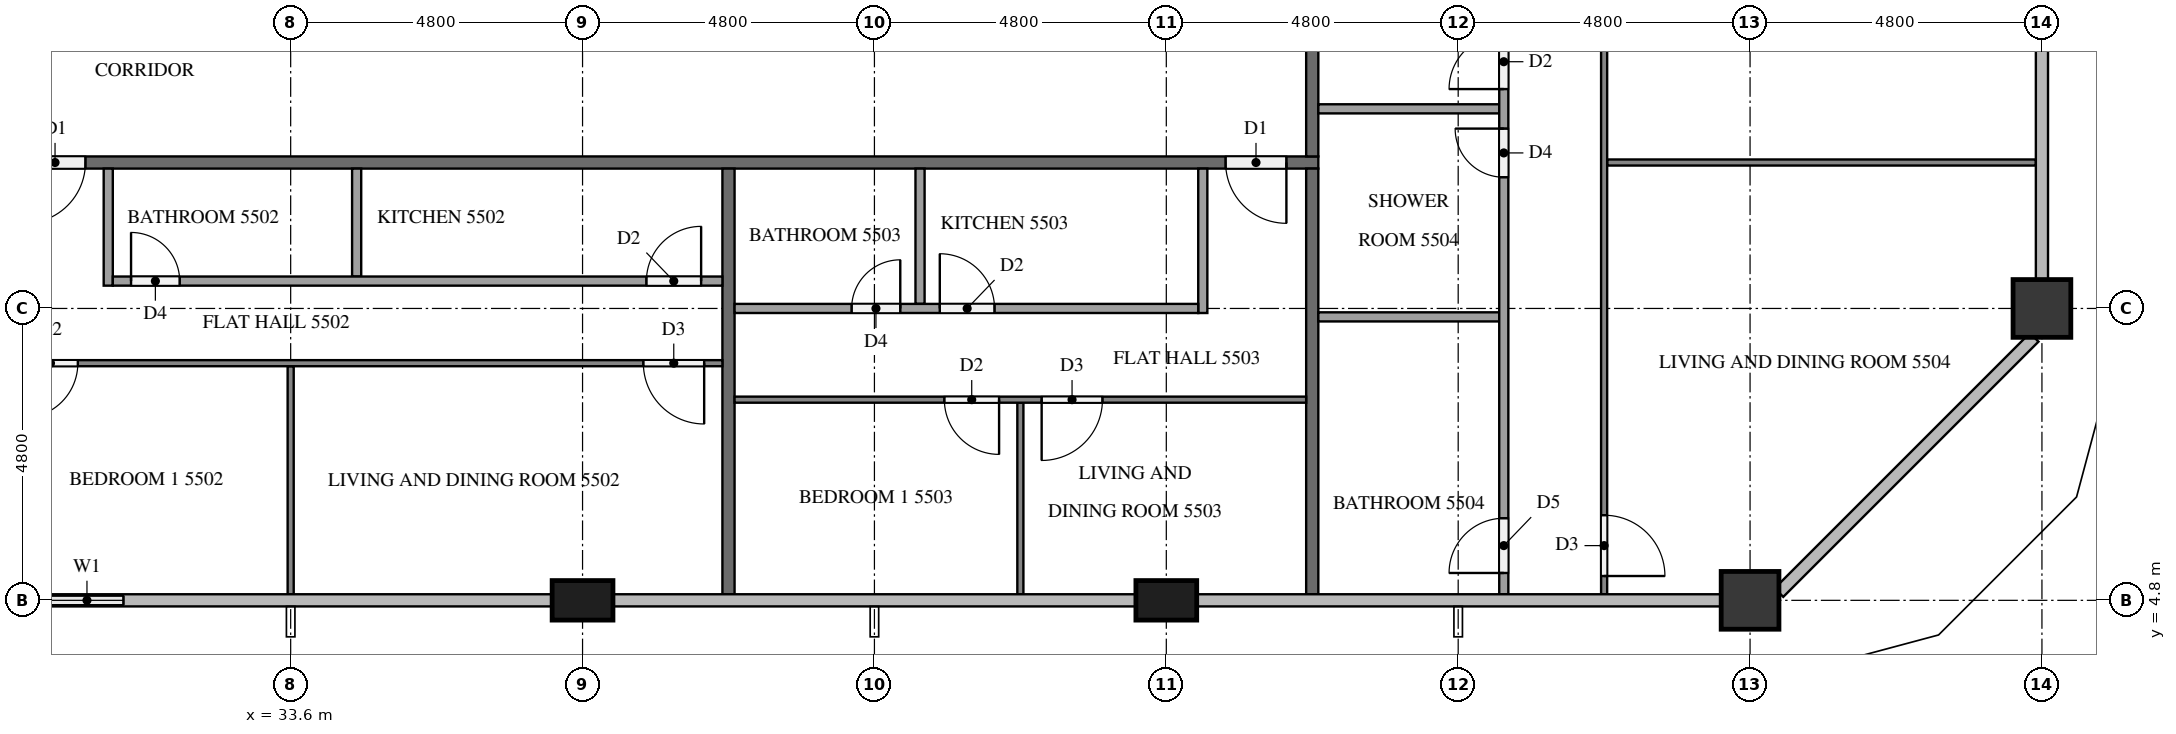
"""IFC4 building model, lengths in metres.
Left out: names, types, materials, properties, quantities, classifications, styles, units other than length and angle.
Written with IfcOpenShell. Run it as: python <this file> out.ifc"""

import sys

from ifc_helpers import new_model, si_unit, direction, frame, frame_2d, origin, origin_2d, place, context, subcontext, project, spatial, rectangle, extrude, element, fill, save


model = new_model("IFC4")
c1 = context("Model", 3, precision=1e-05, world=origin(), true_north=direction((0.0, 1.0)))
c2 = subcontext(c1, "Body", "Model", "MODEL_VIEW")
j1 = project(units=[si_unit("LENGTHUNIT", "METRE"), si_unit("PLANEANGLEUNIT", "RADIAN")], contexts=[c1])
p1 = place(None, origin())
s1 = spatial("IfcSite", under=j1, at=p1, CompositionType="ELEMENT")
p2 = place(p1, origin())
s2 = spatial("IfcBuilding", under=s1, at=p2, CompositionType="ELEMENT")
p3 = place(p2, frame((0.0, 0.0, 212.3)))
s3 = spatial("IfcBuildingStorey", under=s2, at=p3, CompositionType="ELEMENT", Elevation=212.3)
for number, where, z_axis, x_axis in (
    (1, (38.4, 4.8, 0.0), (0.0, 0.0, 1.0), (1.0, 0.0, 0.0)),
    (2, (48.0, 4.8, 0.0), (0.0, 0.0, 1.0), (1.0, 0.0, 0.0)),
):
    element("IfcColumn", number, at=place(p3, frame(where, z_axis=z_axis, x_axis=x_axis)), inside=s3, PredefinedType="COLUMN", context=c2, shape_type="SweptSolid", body=[
        extrude(rectangle(XDim=1.0, YDim=0.65, at=origin_2d()), origin(), (0.0, 0.0, 1.0), 3.2),
    ])
for number, where, z_axis, x_axis in (
    (3, (57.6, 4.8, 0.0), (0.0, 0.0, 1.0), (1.0, 0.0, 0.0)),
    (4, (62.4, 9.6, 0.0), (0.0, 0.0, 1.0), (1.0, 0.0, 0.0)),
):
    element("IfcColumn", number, at=place(p3, frame(where, z_axis=z_axis, x_axis=x_axis)), inside=s3, PredefinedType="COLUMN", context=c2, shape_type="SweptSolid", body=[
        extrude(rectangle(XDim=0.95, YDim=0.95, at=origin_2d()), origin(), (0.0, 0.0, 1.0), 3.2),
    ])
p4 = place(p3, frame((29.3, 4.8, 0.0), z_axis=(0.0, 0.0, 1.0), x_axis=(1.0, 0.0, 0.0)))
e5 = element("IfcWall", 5, at=p4, inside=s3, PredefinedType="SOLIDWALL", context=c2, shape_type="SweptSolid", body=[
    extrude(rectangle(XDim=1.9, YDim=0.15, at=frame_2d((0.95, 0.0))), origin(), (0.0, 0.0, 1.0), 3.2),
])
p5 = place(p4, frame((0.35, 0.0, 0.9)))
e6 = element("IfcOpeningElement", 6, at=p5, cuts=e5, PredefinedType="OPENING", context=c2, shape_type="SweptSolid", body=[
    extrude(rectangle(XDim=1.2, YDim=1.4, at=frame_2d((0.6, 0.7))), frame((0.0, 0.085, 0.0), z_axis=(0.0, -1.0, 0.0), x_axis=(1.0, 0.0, 0.0)), (0.0, 0.0, 1.0), 0.17),
])
p6 = place(p3, frame((50.5, 12.0, 0.0), z_axis=(0.0, 0.0, 1.0), x_axis=(-1.0, 0.0, 0.0)))
e7 = element("IfcWall", 7, at=p6, inside=s3, PredefinedType="PARTITIONING", context=c2, shape_type="SweptSolid", body=[
    extrude(rectangle(XDim=38.6, YDim=0.2, at=frame_2d((19.3, 0.0))), origin(), (0.0, 0.0, 1.0), 3.2),
])
p7 = place(p6, frame((37.075, 0.0, 0.0)))
e8 = element("IfcOpeningElement", 8, at=p7, cuts=e7, PredefinedType="OPENING", context=c2, shape_type="SweptSolid", body=[
    extrude(rectangle(XDim=1.0, YDim=2.1, at=frame_2d((0.5, 1.05))), frame((0.0, 0.11, 0.0), z_axis=(0.0, -1.0, 0.0), x_axis=(1.0, 0.0, 0.0)), (0.0, 0.0, 1.0), 0.22),
])
p8 = place(p6, frame((20.275, 0.0, 0.0)))
e9 = element("IfcOpeningElement", 9, at=p8, cuts=e7, PredefinedType="OPENING", context=c2, shape_type="SweptSolid", body=[
    extrude(rectangle(XDim=1.0, YDim=2.1, at=frame_2d((0.5, 1.05))), frame((0.0, 0.11, 0.0), z_axis=(0.0, -1.0, 0.0), x_axis=(1.0, 0.0, 0.0)), (0.0, 0.0, 1.0), 0.22),
])
p9 = place(p6, frame((0.525, 0.0, 0.0)))
e10 = element("IfcOpeningElement", 10, at=p9, cuts=e7, PredefinedType="OPENING", context=c2, shape_type="SweptSolid", body=[
    extrude(rectangle(XDim=1.0, YDim=2.1, at=frame_2d((0.5, 1.05))), frame((0.0, 0.11, 0.0), z_axis=(0.0, -1.0, 0.0), x_axis=(1.0, 0.0, 0.0)), (0.0, 0.0, 1.0), 0.22),
])
p10 = place(p3, frame((50.4, 40.7, 0.0), z_axis=(0.0, 0.0, 1.0), x_axis=(0.0, -1.0, 0.0)))
e11 = element("IfcWall", 11, at=p10, inside=s3, PredefinedType="PARTITIONING", context=c2, shape_type="SweptSolid", body=[
    extrude(rectangle(XDim=28.6, YDim=0.2, at=frame_2d((14.3, 0.0))), origin(), (0.0, 0.0, 1.0), 3.2),
])
p11 = place(p10, frame((19.525, 0.0, 0.0)))
e12 = element("IfcOpeningElement", 12, at=p11, cuts=e11, PredefinedType="OPENING", context=c2, shape_type="SweptSolid", body=[
    extrude(rectangle(XDim=1.0, YDim=2.1, at=frame_2d((0.5, 1.05))), frame((0.0, 0.11, 0.0), z_axis=(0.0, -1.0, 0.0), x_axis=(1.0, 0.0, 0.0)), (0.0, 0.0, 1.0), 0.22),
])
p12 = place(p10, frame((7.525, 0.0, 0.0)))
e13 = element("IfcOpeningElement", 13, at=p12, cuts=e11, PredefinedType="OPENING", context=c2, shape_type="SweptSolid", body=[
    extrude(rectangle(XDim=1.0, YDim=2.1, at=frame_2d((0.5, 1.05))), frame((0.0, 0.11, 0.0), z_axis=(0.0, -1.0, 0.0), x_axis=(1.0, 0.0, 0.0)), (0.0, 0.0, 1.0), 0.22),
])
p13 = place(p10, frame((0.325, 0.0, 0.0)))
e14 = element("IfcOpeningElement", 14, at=p13, cuts=e11, PredefinedType="OPENING", context=c2, shape_type="SweptSolid", body=[
    extrude(rectangle(XDim=1.0, YDim=2.1, at=frame_2d((0.5, 1.05))), frame((0.0, 0.11, 0.0), z_axis=(0.0, -1.0, 0.0), x_axis=(1.0, 0.0, 0.0)), (0.0, 0.0, 1.0), 0.22),
])
for number, where, z_axis, x_axis in (
    (15, (40.8, 11.9, 0.0), (0.0, 0.0, 1.0), (0.0, -1.0, 0.0)),
    (16, (50.4, 11.9, 0.0), (0.0, 0.0, 1.0), (0.0, -1.0, 0.0)),
):
    element("IfcWall", number, at=place(p3, frame(where, z_axis=z_axis, x_axis=x_axis)), inside=s3, PredefinedType="PARTITIONING", context=c2, shape_type="SweptSolid", body=[
        extrude(rectangle(XDim=7.0, YDim=0.2, at=frame_2d((3.5, 0.0))), origin(), (0.0, 0.0, 1.0), 3.2),
    ])
p14 = place(p3, frame((33.6, 8.65, 0.0), z_axis=(0.0, 0.0, 1.0), x_axis=(0.0, -1.0, 0.0)))
e17 = element("IfcWall", 17, at=p14, inside=s3, PredefinedType="PARTITIONING", context=c2, shape_type="SweptSolid", body=[
    extrude(rectangle(XDim=3.75, YDim=0.1, at=frame_2d((1.875, 0.0))), origin(), (0.0, 0.0, 1.0), 3.2),
])
p15 = place(p3, frame((40.7, 8.7, 0.0), z_axis=(0.0, 0.0, 1.0), x_axis=(-1.0, 0.0, 0.0)))
e18 = element("IfcWall", 18, at=p15, inside=s3, PredefinedType="PARTITIONING", context=c2, shape_type="SweptSolid", body=[
    extrude(rectangle(XDim=11.8, YDim=0.1, at=frame_2d((5.9, 0.0))), origin(), (0.0, 0.0, 1.0), 3.2),
])
p16 = place(p15, frame((10.6, 0.0, 0.0)))
e19 = element("IfcOpeningElement", 19, at=p16, cuts=e18, PredefinedType="OPENING", context=c2, shape_type="SweptSolid", body=[
    extrude(rectangle(XDim=0.9, YDim=2.1, at=frame_2d((0.45, 1.05))), frame((0.0, 0.06, 0.0), z_axis=(0.0, -1.0, 0.0), x_axis=(1.0, 0.0, 0.0)), (0.0, 0.0, 1.0), 0.12),
])
p17 = place(p15, frame((0.3, 0.0, 0.0)))
e20 = element("IfcOpeningElement", 20, at=p17, cuts=e18, PredefinedType="OPENING", context=c2, shape_type="SweptSolid", body=[
    extrude(rectangle(XDim=1.0, YDim=2.1, at=frame_2d((0.5, 1.05))), frame((0.0, 0.06, 0.0), z_axis=(0.0, -1.0, 0.0), x_axis=(1.0, 0.0, 0.0)), (0.0, 0.0, 1.0), 0.12),
])
p18 = place(p3, frame((34.685, 11.9, 0.0), z_axis=(0.0, 0.0, 1.0), x_axis=(0.0, -1.0, 0.0)))
e21 = element("IfcWall", 21, at=p18, inside=s3, PredefinedType="PARTITIONING", context=c2, shape_type="SweptSolid", body=[
    extrude(rectangle(XDim=1.775, YDim=0.15, at=frame_2d((0.887, 0.0))), origin(), (0.0, 0.0, 1.0), 3.2),
])
p19 = place(p3, frame((30.6, 11.9, 0.0), z_axis=(0.0, 0.0, 1.0), x_axis=(0.0, -1.0, 0.0)))
e22 = element("IfcWall", 22, at=p19, inside=s3, PredefinedType="PARTITIONING", context=c2, shape_type="SweptSolid", body=[
    extrude(rectangle(XDim=1.925, YDim=0.15, at=frame_2d((0.962, 0.0))), origin(), (0.0, 0.0, 1.0), 3.2),
])
p20 = place(p3, frame((30.675, 10.05, 0.0), z_axis=(0.0, 0.0, 1.0), x_axis=(1.0, 0.0, 0.0)))
e23 = element("IfcWall", 23, at=p20, inside=s3, PredefinedType="PARTITIONING", context=c2, shape_type="SweptSolid", body=[
    extrude(rectangle(XDim=10.025, YDim=0.15, at=frame_2d((5.012, 0.0))), origin(), (0.0, 0.0, 1.0), 3.2),
])
p21 = place(p20, frame((0.3, 0.0, 0.0)))
e24 = element("IfcOpeningElement", 24, at=p21, cuts=e23, PredefinedType="OPENING", context=c2, shape_type="SweptSolid", body=[
    extrude(rectangle(XDim=0.8, YDim=2.1, at=frame_2d((0.4, 1.05))), frame((0.0, 0.085, 0.0), z_axis=(0.0, -1.0, 0.0), x_axis=(1.0, 0.0, 0.0)), (0.0, 0.0, 1.0), 0.17),
])
p22 = place(p20, frame((8.775, 0.0, 0.0)))
e25 = element("IfcOpeningElement", 25, at=p22, cuts=e23, PredefinedType="OPENING", context=c2, shape_type="SweptSolid", body=[
    extrude(rectangle(XDim=0.9, YDim=2.1, at=frame_2d((0.45, 1.05))), frame((0.0, 0.085, 0.0), z_axis=(0.0, -1.0, 0.0), x_axis=(1.0, 0.0, 0.0)), (0.0, 0.0, 1.0), 0.17),
])
p23 = place(p3, frame((45.6, 8.05, 0.0), z_axis=(0.0, 0.0, 1.0), x_axis=(0.0, -1.0, 0.0)))
e26 = element("IfcWall", 26, at=p23, inside=s3, PredefinedType="PARTITIONING", context=c2, shape_type="SweptSolid", body=[
    extrude(rectangle(XDim=3.15, YDim=0.1, at=frame_2d((1.575, 0.0))), origin(), (0.0, 0.0, 1.0), 3.2),
])
p24 = place(p3, frame((50.3, 8.1, 0.0), z_axis=(0.0, 0.0, 1.0), x_axis=(-1.0, 0.0, 0.0)))
e27 = element("IfcWall", 27, at=p24, inside=s3, PredefinedType="PARTITIONING", context=c2, shape_type="SweptSolid", body=[
    extrude(rectangle(XDim=9.4, YDim=0.1, at=frame_2d((4.7, 0.0))), origin(), (0.0, 0.0, 1.0), 3.2),
])
p25 = place(p24, frame((3.35, 0.0, 0.0)))
e28 = element("IfcOpeningElement", 28, at=p25, cuts=e27, PredefinedType="OPENING", context=c2, shape_type="SweptSolid", body=[
    extrude(rectangle(XDim=1.0, YDim=2.1, at=frame_2d((0.5, 1.05))), frame((0.0, 0.06, 0.0), z_axis=(0.0, -1.0, 0.0), x_axis=(1.0, 0.0, 0.0)), (0.0, 0.0, 1.0), 0.12),
])
p26 = place(p24, frame((5.05, 0.0, 0.0)))
e29 = element("IfcOpeningElement", 29, at=p26, cuts=e27, PredefinedType="OPENING", context=c2, shape_type="SweptSolid", body=[
    extrude(rectangle(XDim=0.9, YDim=2.1, at=frame_2d((0.45, 1.05))), frame((0.0, 0.06, 0.0), z_axis=(0.0, -1.0, 0.0), x_axis=(1.0, 0.0, 0.0)), (0.0, 0.0, 1.0), 0.12),
])
p27 = place(p3, frame((43.95, 11.9, 0.0), z_axis=(0.0, 0.0, 1.0), x_axis=(0.0, -1.0, 0.0)))
e30 = element("IfcWall", 30, at=p27, inside=s3, PredefinedType="PARTITIONING", context=c2, shape_type="SweptSolid", body=[
    extrude(rectangle(XDim=2.225, YDim=0.15, at=frame_2d((1.112, 0.0))), origin(), (0.0, 0.0, 1.0), 3.2),
])
p28 = place(p3, frame((48.6, 11.9, 0.0), z_axis=(0.0, 0.0, 1.0), x_axis=(0.0, -1.0, 0.0)))
e31 = element("IfcWall", 31, at=p28, inside=s3, PredefinedType="PARTITIONING", context=c2, shape_type="SweptSolid", body=[
    extrude(rectangle(XDim=2.375, YDim=0.15, at=frame_2d((1.188, 0.0))), origin(), (0.0, 0.0, 1.0), 3.2),
])
p29 = place(p3, frame((40.9, 9.6, 0.0), z_axis=(0.0, 0.0, 1.0), x_axis=(1.0, 0.0, 0.0)))
e32 = element("IfcWall", 32, at=p29, inside=s3, PredefinedType="PARTITIONING", context=c2, shape_type="SweptSolid", body=[
    extrude(rectangle(XDim=7.625, YDim=0.15, at=frame_2d((3.812, 0.0))), origin(), (0.0, 0.0, 1.0), 3.2),
])
p30 = place(p29, frame((3.375, 0.0, 0.0)))
e33 = element("IfcOpeningElement", 33, at=p30, cuts=e32, PredefinedType="OPENING", context=c2, shape_type="SweptSolid", body=[
    extrude(rectangle(XDim=0.9, YDim=2.1, at=frame_2d((0.45, 1.05))), frame((0.0, 0.085, 0.0), z_axis=(0.0, -1.0, 0.0), x_axis=(1.0, 0.0, 0.0)), (0.0, 0.0, 1.0), 0.17),
])
p31 = place(p29, frame((1.925, 0.0, 0.0)))
e34 = element("IfcOpeningElement", 34, at=p31, cuts=e32, PredefinedType="OPENING", context=c2, shape_type="SweptSolid", body=[
    extrude(rectangle(XDim=0.8, YDim=2.1, at=frame_2d((0.4, 1.05))), frame((0.0, 0.085, 0.0), z_axis=(0.0, -1.0, 0.0), x_axis=(1.0, 0.0, 0.0)), (0.0, 0.0, 1.0), 0.17),
])
p32 = place(p3, frame((55.25, 12.0, 0.0), z_axis=(0.0, 0.0, 1.0), x_axis=(1.0, 0.0, 0.0)))
e35 = element("IfcWall", 35, at=p32, inside=s3, PredefinedType="PARTITIONING", context=c2, shape_type="SweptSolid", body=[
    extrude(rectangle(XDim=7.05, YDim=0.1, at=frame_2d((3.525, 0.0))), origin(), (0.0, 0.0, 1.0), 3.2),
])
p33 = place(p3, frame((55.2, 21.5, 0.0), z_axis=(0.0, 0.0, 1.0), x_axis=(0.0, -1.0, 0.0)))
e36 = element("IfcWall", 36, at=p33, inside=s3, PredefinedType="PARTITIONING", context=c2, shape_type="SweptSolid", body=[
    extrude(rectangle(XDim=16.6, YDim=0.1, at=frame_2d((8.3, 0.0))), origin(), (0.0, 0.0, 1.0), 3.2),
])
p34 = place(p33, frame((3.45, 0.0, 0.0)))
e37 = element("IfcOpeningElement", 37, at=p34, cuts=e36, PredefinedType="OPENING", context=c2, shape_type="SweptSolid", body=[
    extrude(rectangle(XDim=0.9, YDim=2.1, at=frame_2d((0.45, 1.05))), frame((0.0, 0.06, 0.0), z_axis=(0.0, -1.0, 0.0), x_axis=(1.0, 0.0, 0.0)), (0.0, 0.0, 1.0), 0.12),
])
p35 = place(p33, frame((5.05, 0.0, 0.0)))
e38 = element("IfcOpeningElement", 38, at=p35, cuts=e36, PredefinedType="OPENING", context=c2, shape_type="SweptSolid", body=[
    extrude(rectangle(XDim=0.9, YDim=2.1, at=frame_2d((0.45, 1.05))), frame((0.0, 0.06, 0.0), z_axis=(0.0, -1.0, 0.0), x_axis=(1.0, 0.0, 0.0)), (0.0, 0.0, 1.0), 0.12),
])
p36 = place(p33, frame((15.3, 0.0, 0.0)))
e39 = element("IfcOpeningElement", 39, at=p36, cuts=e36, PredefinedType="OPENING", context=c2, shape_type="SweptSolid", body=[
    extrude(rectangle(XDim=1.0, YDim=2.1, at=frame_2d((0.5, 1.05))), frame((0.0, 0.06, 0.0), z_axis=(0.0, -1.0, 0.0), x_axis=(1.0, 0.0, 0.0)), (0.0, 0.0, 1.0), 0.12),
])
for number, where, z_axis, x_axis in (
    (40, (50.5, 12.883, 0.0), (0.0, 0.0, 1.0), (1.0, 0.0, 0.0)),
    (41, (50.5, 9.461, 0.0), (0.0, 0.0, 1.0), (1.0, 0.0, 0.0)),
):
    element("IfcWall", number, at=place(p3, frame(where, z_axis=z_axis, x_axis=x_axis)), inside=s3, PredefinedType="PARTITIONING", context=c2, shape_type="SweptSolid", body=[
        extrude(rectangle(XDim=2.975, YDim=0.15, at=frame_2d((1.488, 0.0))), origin(), (0.0, 0.0, 1.0), 3.2),
    ])
p37 = place(p3, frame((53.55, 4.9, 0.0), z_axis=(0.0, 0.0, 1.0), x_axis=(0.0, 1.0, 0.0)))
e42 = element("IfcWall", 42, at=p37, inside=s3, PredefinedType="PARTITIONING", context=c2, shape_type="SweptSolid", body=[
    extrude(rectangle(XDim=14.825, YDim=0.15, at=frame_2d((7.413, 0.0))), origin(), (0.0, 0.0, 1.0), 3.2),
])
p38 = place(p37, frame((8.308, 0.0, 0.0)))
e43 = element("IfcOpeningElement", 43, at=p38, cuts=e42, PredefinedType="OPENING", context=c2, shape_type="SweptSolid", body=[
    extrude(rectangle(XDim=0.9, YDim=2.1, at=frame_2d((0.45, 1.05))), frame((0.0, 0.085, 0.0), z_axis=(0.0, -1.0, 0.0), x_axis=(1.0, 0.0, 0.0)), (0.0, 0.0, 1.0), 0.17),
])
p39 = place(p37, frame((6.858, 0.0, 0.0)))
e44 = element("IfcOpeningElement", 44, at=p39, cuts=e42, PredefinedType="OPENING", context=c2, shape_type="SweptSolid", body=[
    extrude(rectangle(XDim=0.8, YDim=2.1, at=frame_2d((0.4, 1.05))), frame((0.0, 0.085, 0.0), z_axis=(0.0, -1.0, 0.0), x_axis=(1.0, 0.0, 0.0)), (0.0, 0.0, 1.0), 0.17),
])
p40 = place(p37, frame((0.35, 0.0, 0.0)))
e45 = element("IfcOpeningElement", 45, at=p40, cuts=e42, PredefinedType="OPENING", context=c2, shape_type="SweptSolid", body=[
    extrude(rectangle(XDim=0.9, YDim=2.1, at=frame_2d((0.45, 1.05))), frame((0.0, 0.085, 0.0), z_axis=(0.0, -1.0, 0.0), x_axis=(1.0, 0.0, 0.0)), (0.0, 0.0, 1.0), 0.17),
])
p41 = place(p5, origin())
e46 = element("IfcWindow", 46, at=p41, inside=s3, PartitioningType="SINGLE_PANEL", PredefinedType="WINDOW", context=c2, shape_type="SweptSolid", body=[
    extrude(rectangle(XDim=1.2, YDim=1.4, at=frame_2d((0.6, 0.7))), frame((0.0, 0.03, 0.0), z_axis=(0.0, -1.0, 0.0), x_axis=(1.0, 0.0, 0.0)), (0.0, 0.0, 1.0), 0.06),
])
fill(e6, e46)
p42 = place(p8, origin())
e47 = element("IfcDoor", 47, at=p42, inside=s3, OperationType="SINGLE_SWING_RIGHT", PredefinedType="DOOR", context=c2, shape_type="SweptSolid", body=[
    extrude(rectangle(XDim=1.0, YDim=2.1, at=frame_2d((0.5, 1.05))), frame((0.0, 0.025, 0.0), z_axis=(0.0, -1.0, 0.0), x_axis=(1.0, 0.0, 0.0)), (0.0, 0.0, 1.0), 0.05),
])
fill(e9, e47)
p43 = place(p9, origin())
e48 = element("IfcDoor", 48, at=p43, inside=s3, OperationType="SINGLE_SWING_LEFT", PredefinedType="DOOR", context=c2, shape_type="SweptSolid", body=[
    extrude(rectangle(XDim=1.0, YDim=2.1, at=frame_2d((0.5, 1.05))), frame((0.0, 0.025, 0.0), z_axis=(0.0, -1.0, 0.0), x_axis=(1.0, 0.0, 0.0)), (0.0, 0.0, 1.0), 0.05),
])
fill(e10, e48)
p44 = place(p16, origin())
e49 = element("IfcDoor", 49, at=p44, inside=s3, OperationType="SINGLE_SWING_RIGHT", PredefinedType="DOOR", context=c2, shape_type="SweptSolid", body=[
    extrude(rectangle(XDim=0.9, YDim=2.1, at=frame_2d((0.45, 1.05))), frame((0.0, 0.025, 0.0), z_axis=(0.0, -1.0, 0.0), x_axis=(1.0, 0.0, 0.0)), (0.0, 0.0, 1.0), 0.05),
])
fill(e19, e49)
p45 = place(p17, origin())
e50 = element("IfcDoor", 50, at=p45, inside=s3, OperationType="SINGLE_SWING_LEFT", PredefinedType="DOOR", context=c2, shape_type="SweptSolid", body=[
    extrude(rectangle(XDim=1.0, YDim=2.1, at=frame_2d((0.5, 1.05))), frame((0.0, 0.025, 0.0), z_axis=(0.0, -1.0, 0.0), x_axis=(1.0, 0.0, 0.0)), (0.0, 0.0, 1.0), 0.05),
])
fill(e20, e50)
p46 = place(p21, origin())
e51 = element("IfcDoor", 51, at=p46, inside=s3, OperationType="SINGLE_SWING_LEFT", PredefinedType="DOOR", context=c2, shape_type="SweptSolid", body=[
    extrude(rectangle(XDim=0.8, YDim=2.1, at=frame_2d((0.4, 1.05))), frame((0.0, 0.025, 0.0), z_axis=(0.0, -1.0, 0.0), x_axis=(1.0, 0.0, 0.0)), (0.0, 0.0, 1.0), 0.05),
])
fill(e24, e51)
p47 = place(p22, origin())
e52 = element("IfcDoor", 52, at=p47, inside=s3, OperationType="SINGLE_SWING_RIGHT", PredefinedType="DOOR", context=c2, shape_type="SweptSolid", body=[
    extrude(rectangle(XDim=0.9, YDim=2.1, at=frame_2d((0.45, 1.05))), frame((0.0, 0.025, 0.0), z_axis=(0.0, -1.0, 0.0), x_axis=(1.0, 0.0, 0.0)), (0.0, 0.0, 1.0), 0.05),
])
fill(e25, e52)
p48 = place(p25, origin())
e53 = element("IfcDoor", 53, at=p48, inside=s3, OperationType="SINGLE_SWING_RIGHT", PredefinedType="DOOR", context=c2, shape_type="SweptSolid", body=[
    extrude(rectangle(XDim=1.0, YDim=2.1, at=frame_2d((0.5, 1.05))), frame((0.0, 0.025, 0.0), z_axis=(0.0, -1.0, 0.0), x_axis=(1.0, 0.0, 0.0)), (0.0, 0.0, 1.0), 0.05),
])
fill(e28, e53)
p49 = place(p26, origin())
e54 = element("IfcDoor", 54, at=p49, inside=s3, OperationType="SINGLE_SWING_LEFT", PredefinedType="DOOR", context=c2, shape_type="SweptSolid", body=[
    extrude(rectangle(XDim=0.9, YDim=2.1, at=frame_2d((0.45, 1.05))), frame((0.0, 0.025, 0.0), z_axis=(0.0, -1.0, 0.0), x_axis=(1.0, 0.0, 0.0)), (0.0, 0.0, 1.0), 0.05),
])
fill(e29, e54)
p50 = place(p30, origin())
e55 = element("IfcDoor", 55, at=p50, inside=s3, OperationType="SINGLE_SWING_LEFT", PredefinedType="DOOR", context=c2, shape_type="SweptSolid", body=[
    extrude(rectangle(XDim=0.9, YDim=2.1, at=frame_2d((0.45, 1.05))), frame((0.0, 0.025, 0.0), z_axis=(0.0, -1.0, 0.0), x_axis=(1.0, 0.0, 0.0)), (0.0, 0.0, 1.0), 0.05),
])
fill(e33, e55)
p51 = place(p31, origin())
e56 = element("IfcDoor", 56, at=p51, inside=s3, OperationType="SINGLE_SWING_RIGHT", PredefinedType="DOOR", context=c2, shape_type="SweptSolid", body=[
    extrude(rectangle(XDim=0.8, YDim=2.1, at=frame_2d((0.4, 1.05))), frame((0.0, 0.025, 0.0), z_axis=(0.0, -1.0, 0.0), x_axis=(1.0, 0.0, 0.0)), (0.0, 0.0, 1.0), 0.05),
])
fill(e34, e56)
p52 = place(p36, origin())
e57 = element("IfcDoor", 57, at=p52, inside=s3, OperationType="SINGLE_SWING_RIGHT", PredefinedType="DOOR", context=c2, shape_type="SweptSolid", body=[
    extrude(rectangle(XDim=1.0, YDim=2.1, at=frame_2d((0.5, 1.05))), frame((0.0, 0.025, 0.0), z_axis=(0.0, -1.0, 0.0), x_axis=(1.0, 0.0, 0.0)), (0.0, 0.0, 1.0), 0.05),
])
fill(e39, e57)
p53 = place(p38, origin())
e58 = element("IfcDoor", 58, at=p53, inside=s3, OperationType="SINGLE_SWING_LEFT", PredefinedType="DOOR", context=c2, shape_type="SweptSolid", body=[
    extrude(rectangle(XDim=0.9, YDim=2.1, at=frame_2d((0.45, 1.05))), frame((0.0, 0.025, 0.0), z_axis=(0.0, -1.0, 0.0), x_axis=(1.0, 0.0, 0.0)), (0.0, 0.0, 1.0), 0.05),
])
fill(e43, e58)
p54 = place(p39, origin())
e59 = element("IfcDoor", 59, at=p54, inside=s3, OperationType="SINGLE_SWING_RIGHT", PredefinedType="DOOR", context=c2, shape_type="SweptSolid", body=[
    extrude(rectangle(XDim=0.8, YDim=2.1, at=frame_2d((0.4, 1.05))), frame((0.0, 0.025, 0.0), z_axis=(0.0, -1.0, 0.0), x_axis=(1.0, 0.0, 0.0)), (0.0, 0.0, 1.0), 0.05),
])
fill(e44, e59)
p55 = place(p40, origin())
e60 = element("IfcDoor", 60, at=p55, inside=s3, OperationType="SINGLE_SWING_LEFT", PredefinedType="DOOR", context=c2, shape_type="SweptSolid", body=[
    extrude(rectangle(XDim=0.9, YDim=2.1, at=frame_2d((0.45, 1.05))), frame((0.0, 0.025, 0.0), z_axis=(0.0, -1.0, 0.0), x_axis=(1.0, 0.0, 0.0)), (0.0, 0.0, 1.0), 0.05),
])
fill(e45, e60)
save(model, sys.argv[1])
